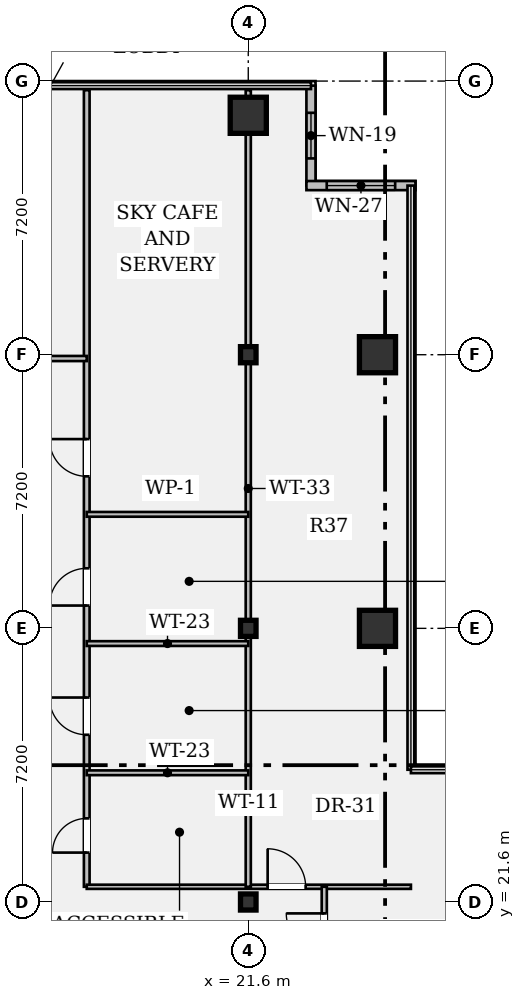
"""IFC4 building model, lengths in metres.
Left out: names, types, materials, properties, quantities, classifications, styles, units other than length and angle.
Written with IfcOpenShell. Run it as: python <this file> out.ifc"""

import sys

from ifc_helpers import new_model, si_unit, direction, frame, frame_2d, origin, origin_2d, place, context, subcontext, project, spatial, rectangle, hollow_rectangle, i_section, extrude, element, fill, save


model = new_model("IFC4")
c1 = context("Model", 3, precision=1e-05, world=origin(), true_north=direction((0.0, 1.0)))
c2 = subcontext(c1, "Body", "Model", "MODEL_VIEW")
j1 = project(units=[si_unit("LENGTHUNIT", "METRE"), si_unit("PLANEANGLEUNIT", "RADIAN")], contexts=[c1])
p1 = place(None, origin())
s1 = spatial("IfcSite", under=j1, at=p1, CompositionType="ELEMENT")
p2 = place(p1, origin())
s2 = spatial("IfcBuilding", under=s1, at=p2, CompositionType="ELEMENT")
p3 = place(p2, frame((0.0, 0.0, 97.65)))
s3 = spatial("IfcBuildingStorey", under=s2, at=p3, CompositionType="ELEMENT", Elevation=97.65)
for number, where, z_axis, x_axis in (
    (1, (21.6, 21.6, 0.0), (0.0, 0.0, 1.0), (1.0, 0.0, 0.0)),
    (2, (21.6, 28.8, 0.0), (0.0, 0.0, 1.0), (1.0, 0.0, 0.0)),
    (3, (21.6, 36.0, 0.0), (0.0, 0.0, 1.0), (1.0, 0.0, 0.0)),
):
    element("IfcColumn", number, at=place(p3, frame(where, z_axis=z_axis, x_axis=x_axis)), inside=s3, PredefinedType="COLUMN", context=c2, shape_type="SweptSolid", body=[
        extrude(i_section(OverallWidth=0.409, OverallDepth=0.424, WebThickness=0.033, FlangeThickness=0.052, FilletRadius=0.018, at=origin_2d()), origin(), (0.0, 0.0, 1.0), 4.28),
    ])
for number, where, z_axis, x_axis in (
    (4, (21.6, 42.3, 0.0), (0.0, 0.0, 1.0), (1.0, 0.0, 0.0)),
    (5, (25.0, 28.8, 0.0), (0.0, 0.0, 1.0), (1.0, 0.0, 0.0)),
    (6, (25.0, 36.0, 0.0), (0.0, 0.0, 1.0), (1.0, 0.0, 0.0)),
):
    element("IfcColumn", number, at=place(p3, frame(where, z_axis=z_axis, x_axis=x_axis)), inside=s3, PredefinedType="COLUMN", context=c2, shape_type="SweptSolid", body=[
        extrude(hollow_rectangle(XDim=0.95, YDim=0.95, WallThickness=0.06, at=origin_2d()), origin(), (0.0, 0.0, 1.0), 4.28),
    ])
p4 = place(p3, frame((23.25, 43.08, 0.0), z_axis=(0.0, 0.0, 1.0), x_axis=(0.0, -1.0, 0.0)))
e7 = element("IfcWall", 7, at=p4, inside=s3, PredefinedType="STANDARD", context=c2, shape_type="SweptSolid", body=[
    extrude(rectangle(XDim=2.63, YDim=0.24, at=frame_2d((1.315, 0.0))), origin(), (0.0, 0.0, 1.0), 4.28),
])
p5 = place(p4, frame((0.715, 0.0, 0.95)))
e8 = element("IfcOpeningElement", 8, at=p5, cuts=e7, PredefinedType="OPENING", context=c2, shape_type="SweptSolid", body=[
    extrude(rectangle(XDim=1.2, YDim=1.8, at=frame_2d((0.6, 0.9))), frame((0.0, 0.132, 0.0), z_axis=(0.0, -1.0, 0.0), x_axis=(1.0, 0.0, 0.0)), (0.0, 0.0, 1.0), 0.264),
])
p6 = place(p3, frame((23.13, 40.45, 0.0), z_axis=(0.0, 0.0, 1.0), x_axis=(1.0, 0.0, 0.0)))
e9 = element("IfcWall", 9, at=p6, inside=s3, PredefinedType="STANDARD", context=c2, shape_type="SweptSolid", body=[
    extrude(rectangle(XDim=2.87, YDim=0.24, at=frame_2d((1.435, 0.0))), origin(), (0.0, 0.0, 1.0), 4.28),
])
p7 = place(p6, frame((0.535, 0.0, 0.95)))
e10 = element("IfcOpeningElement", 10, at=p7, cuts=e9, PredefinedType="OPENING", context=c2, shape_type="SweptSolid", body=[
    extrude(rectangle(XDim=1.8, YDim=1.35, at=frame_2d((0.9, 0.675))), frame((0.0, 0.132, 0.0), z_axis=(0.0, -1.0, 0.0), x_axis=(1.0, 0.0, 0.0)), (0.0, 0.0, 1.0), 0.264),
])
p8 = place(p3, frame((17.35, 22.0, 0.0), z_axis=(0.0, 0.0, 1.0), x_axis=(0.0, 1.0, 0.0)))
e11 = element("IfcWall", 11, at=p8, inside=s3, PredefinedType="PARTITIONING", context=c2, shape_type="SweptSolid", body=[
    extrude(rectangle(XDim=20.96, YDim=0.15, at=frame_2d((10.48, 0.0))), origin(), (0.0, 0.0, 1.0), 3.493),
])
p9 = place(p8, frame((0.9, 0.0, 0.0)))
e12 = element("IfcOpeningElement", 12, at=p9, cuts=e11, PredefinedType="OPENING", context=c2, shape_type="SweptSolid", body=[
    extrude(rectangle(XDim=0.9, YDim=2.15, at=frame_2d((0.45, 1.075))), frame((0.0, 0.087, 0.0), z_axis=(0.0, -1.0, 0.0), x_axis=(1.0, 0.0, 0.0)), (0.0, 0.0, 1.0), 0.174),
])
p10 = place(p8, frame((4.0, 0.0, 0.0)))
e13 = element("IfcOpeningElement", 13, at=p10, cuts=e11, PredefinedType="OPENING", context=c2, shape_type="SweptSolid", body=[
    extrude(rectangle(XDim=0.98, YDim=2.15, at=frame_2d((0.49, 1.075))), frame((0.0, 0.087, 0.0), z_axis=(0.0, -1.0, 0.0), x_axis=(1.0, 0.0, 0.0)), (0.0, 0.0, 1.0), 0.174),
])
p11 = place(p8, frame((7.4, 0.0, 0.0)))
e14 = element("IfcOpeningElement", 14, at=p11, cuts=e11, PredefinedType="OPENING", context=c2, shape_type="SweptSolid", body=[
    extrude(rectangle(XDim=0.98, YDim=2.15, at=frame_2d((0.49, 1.075))), frame((0.0, 0.087, 0.0), z_axis=(0.0, -1.0, 0.0), x_axis=(1.0, 0.0, 0.0)), (0.0, 0.0, 1.0), 0.174),
])
p12 = place(p8, frame((10.8, 0.0, 0.0)))
e15 = element("IfcOpeningElement", 15, at=p12, cuts=e11, PredefinedType="OPENING", context=c2, shape_type="SweptSolid", body=[
    extrude(rectangle(XDim=0.98, YDim=2.15, at=frame_2d((0.49, 1.075))), frame((0.0, 0.087, 0.0), z_axis=(0.0, -1.0, 0.0), x_axis=(1.0, 0.0, 0.0)), (0.0, 0.0, 1.0), 0.174),
])
p13 = place(p3, frame((14.4, 35.9, 0.0), z_axis=(0.0, 0.0, 1.0), x_axis=(1.0, 0.0, 0.0)))
e16 = element("IfcWall", 16, at=p13, inside=s3, PredefinedType="PARTITIONING", context=c2, shape_type="SweptSolid", body=[
    extrude(rectangle(XDim=2.95, YDim=0.135, at=frame_2d((1.475, 0.0))), origin(), (0.0, 0.0, 1.0), 3.493),
])
p14 = place(p13, frame((0.95, 0.0, 0.0)))
e17 = element("IfcOpeningElement", 17, at=p14, cuts=e16, PredefinedType="OPENING", context=c2, shape_type="SweptSolid", body=[
    extrude(rectangle(XDim=1.0, YDim=2.15, at=frame_2d((0.5, 1.075))), frame((0.0, 0.08, 0.0), z_axis=(0.0, -1.0, 0.0), x_axis=(1.0, 0.0, 0.0)), (0.0, 0.0, 1.0), 0.159),
])
p15 = place(p3, frame((17.35, 22.0, 0.0), z_axis=(0.0, 0.0, 1.0), x_axis=(1.0, 0.0, 0.0)))
e18 = element("IfcWall", 18, at=p15, inside=s3, PredefinedType="PARTITIONING", context=c2, shape_type="SweptSolid", body=[
    extrude(rectangle(XDim=8.53, YDim=0.11, at=frame_2d((4.265, 0.0))), origin(), (0.0, 0.0, 1.0), 3.493),
])
p16 = place(p15, frame((4.76, 0.0, 0.0)))
e19 = element("IfcOpeningElement", 19, at=p16, cuts=e18, PredefinedType="OPENING", context=c2, shape_type="SweptSolid", body=[
    extrude(rectangle(XDim=1.0, YDim=2.15, at=frame_2d((0.5, 1.075))), frame((0.0, 0.067, 0.0), z_axis=(0.0, -1.0, 0.0), x_axis=(1.0, 0.0, 0.0)), (0.0, 0.0, 1.0), 0.134),
])
p17 = place(p3, frame((21.6, 22.0, 0.0), z_axis=(0.0, 0.0, 1.0), x_axis=(0.0, 1.0, 0.0)))
e20 = element("IfcWall", 20, at=p17, inside=s3, PredefinedType="PARTITIONING", context=c2, shape_type="SweptSolid", body=[
    extrude(rectangle(XDim=20.96, YDim=0.135, at=frame_2d((10.48, 0.0))), origin(), (0.0, 0.0, 1.0), 3.493),
])
for number, where, z_axis, x_axis in (
    (21, (17.35, 25.0, 0.0), (0.0, 0.0, 1.0), (1.0, 0.0, 0.0)),
    (22, (17.35, 28.4, 0.0), (0.0, 0.0, 1.0), (1.0, 0.0, 0.0)),
    (23, (17.35, 31.8, 0.0), (0.0, 0.0, 1.0), (1.0, 0.0, 0.0)),
):
    element("IfcWall", number, at=place(p3, frame(where, z_axis=z_axis, x_axis=x_axis)), inside=s3, PredefinedType="PARTITIONING", context=c2, shape_type="SweptSolid", body=[
        extrude(rectangle(XDim=4.25, YDim=0.125, at=frame_2d((2.125, 0.0))), origin(), (0.0, 0.0, 1.0), 3.493),
    ])
p18 = place(p3, frame((23.6, 19.75, 0.0), z_axis=(0.0, 0.0, 1.0), x_axis=(0.0, 1.0, 0.0)))
e24 = element("IfcWall", 24, at=p18, inside=s3, PredefinedType="PARTITIONING", context=c2, shape_type="SweptSolid", body=[
    extrude(rectangle(XDim=2.25, YDim=0.135, at=frame_2d((1.125, 0.0))), origin(), (0.0, 0.0, 1.0), 3.493),
])
p19 = place(p18, frame((0.55, 0.0, 0.0)))
e25 = element("IfcOpeningElement", 25, at=p19, cuts=e24, PredefinedType="OPENING", context=c2, shape_type="SweptSolid", body=[
    extrude(rectangle(XDim=1.0, YDim=2.15, at=frame_2d((0.5, 1.075))), frame((0.0, 0.08, 0.0), z_axis=(0.0, -1.0, 0.0), x_axis=(1.0, 0.0, 0.0)), (0.0, 0.0, 1.0), 0.159),
])
p20 = place(p5, origin())
e26 = element("IfcWindow", 26, at=p20, inside=s3, PartitioningType="SINGLE_PANEL", PredefinedType="WINDOW", context=c2, shape_type="SweptSolid", body=[
    extrude(rectangle(XDim=1.2, YDim=1.8, at=frame_2d((0.6, 0.9))), frame((0.0, 0.03, 0.0), z_axis=(0.0, -1.0, 0.0), x_axis=(1.0, 0.0, 0.0)), (0.0, 0.0, 1.0), 0.06),
])
fill(e8, e26)
p21 = place(p7, origin())
e27 = element("IfcWindow", 27, at=p21, inside=s3, PartitioningType="SINGLE_PANEL", PredefinedType="WINDOW", context=c2, shape_type="SweptSolid", body=[
    extrude(rectangle(XDim=1.8, YDim=1.35, at=frame_2d((0.9, 0.675))), frame((0.0, 0.03, 0.0), z_axis=(0.0, -1.0, 0.0), x_axis=(1.0, 0.0, 0.0)), (0.0, 0.0, 1.0), 0.06),
])
fill(e10, e27)
p22 = place(p19, origin())
e28 = element("IfcDoor", 28, at=p22, inside=s3, OperationType="SINGLE_SWING_RIGHT", PredefinedType="DOOR", context=c2, shape_type="SweptSolid", body=[
    extrude(rectangle(XDim=1.0, YDim=2.15, at=frame_2d((0.5, 1.075))), frame((0.0, 0.025, 0.0), z_axis=(0.0, -1.0, 0.0), x_axis=(1.0, 0.0, 0.0)), (0.0, 0.0, 1.0), 0.05),
])
fill(e25, e28)
p23 = place(p9, origin())
e29 = element("IfcDoor", 29, at=p23, inside=s3, OperationType="SINGLE_SWING_LEFT", PredefinedType="DOOR", context=c2, shape_type="SweptSolid", body=[
    extrude(rectangle(XDim=0.9, YDim=2.15, at=frame_2d((0.45, 1.075))), frame((0.0, 0.025, 0.0), z_axis=(0.0, -1.0, 0.0), x_axis=(1.0, 0.0, 0.0)), (0.0, 0.0, 1.0), 0.05),
])
fill(e12, e29)
p24 = place(p10, origin())
e30 = element("IfcDoor", 30, at=p24, inside=s3, OperationType="SINGLE_SWING_RIGHT", PredefinedType="DOOR", context=c2, shape_type="SweptSolid", body=[
    extrude(rectangle(XDim=0.98, YDim=2.15, at=frame_2d((0.49, 1.075))), frame((0.0, 0.025, 0.0), z_axis=(0.0, -1.0, 0.0), x_axis=(1.0, 0.0, 0.0)), (0.0, 0.0, 1.0), 0.05),
])
fill(e13, e30)
p25 = place(p11, origin())
e31 = element("IfcDoor", 31, at=p25, inside=s3, OperationType="SINGLE_SWING_LEFT", PredefinedType="DOOR", context=c2, shape_type="SweptSolid", body=[
    extrude(rectangle(XDim=0.98, YDim=2.15, at=frame_2d((0.49, 1.075))), frame((0.0, 0.025, 0.0), z_axis=(0.0, -1.0, 0.0), x_axis=(1.0, 0.0, 0.0)), (0.0, 0.0, 1.0), 0.05),
])
fill(e14, e31)
p26 = place(p12, origin())
e32 = element("IfcDoor", 32, at=p26, inside=s3, OperationType="SINGLE_SWING_RIGHT", PredefinedType="DOOR", context=c2, shape_type="SweptSolid", body=[
    extrude(rectangle(XDim=0.98, YDim=2.15, at=frame_2d((0.49, 1.075))), frame((0.0, 0.025, 0.0), z_axis=(0.0, -1.0, 0.0), x_axis=(1.0, 0.0, 0.0)), (0.0, 0.0, 1.0), 0.05),
])
fill(e15, e32)
p27 = place(p16, origin())
e33 = element("IfcDoor", 33, at=p27, inside=s3, OperationType="SINGLE_SWING_LEFT", PredefinedType="DOOR", context=c2, shape_type="SweptSolid", body=[
    extrude(rectangle(XDim=1.0, YDim=2.15, at=frame_2d((0.5, 1.075))), frame((0.0, 0.025, 0.0), z_axis=(0.0, -1.0, 0.0), x_axis=(1.0, 0.0, 0.0)), (0.0, 0.0, 1.0), 0.05),
])
fill(e19, e33)
save(model, sys.argv[1])
